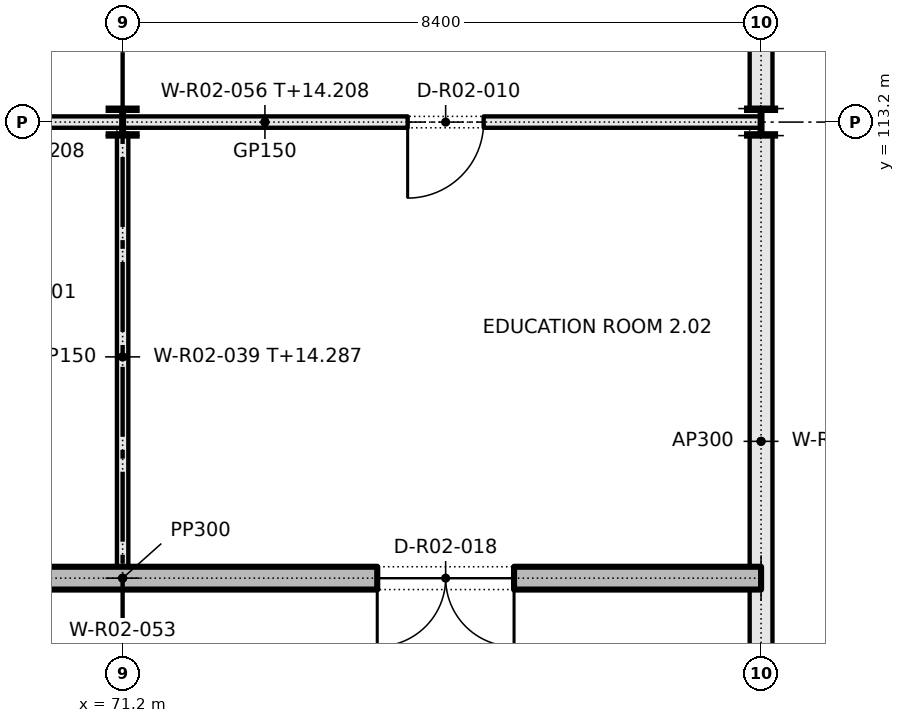
"""IFC4 building model, lengths in metres.
Left out: names, types, materials, properties, quantities, classifications, styles, units other than length and angle.
Written with IfcOpenShell. Run it as: python <this file> out.ifc"""

import sys

from ifc_helpers import new_model, si_unit, direction, frame, frame_2d, origin, origin_2d, place, context, subcontext, project, spatial, rectangle, i_section, extrude, element, fill, save


model = new_model("IFC4")
c1 = context("Model", 3, precision=1e-05, world=origin(), true_north=direction((0.0, 1.0)))
c2 = subcontext(c1, "Body", "Model", "MODEL_VIEW")
j1 = project(units=[si_unit("LENGTHUNIT", "METRE"), si_unit("PLANEANGLEUNIT", "RADIAN")], contexts=[c1])
p1 = place(None, origin())
s1 = spatial("IfcSite", under=j1, at=p1, CompositionType="ELEMENT")
p2 = place(p1, origin())
s2 = spatial("IfcBuilding", under=s1, at=p2, CompositionType="ELEMENT")
p3 = place(p2, frame((0.0, 0.0, 10.2)))
s3 = spatial("IfcBuildingStorey", under=s2, at=p3, CompositionType="ELEMENT", Elevation=10.2)
for number, where, z_axis, x_axis in (
    (1, (71.2, 113.2, 0.0), (0.0, 0.0, 1.0), (1.0, 0.0, 0.0)),
    (2, (79.6, 113.2, 0.0), (0.0, 0.0, 1.0), (1.0, 0.0, 0.0)),
):
    element("IfcColumn", number, at=place(p3, frame(where, z_axis=z_axis, x_axis=x_axis)), inside=s3, PredefinedType="COLUMN", context=c2, shape_type="SweptSolid", body=[
        extrude(i_section(OverallWidth=0.368, OverallDepth=0.356, WebThickness=0.011, FlangeThickness=0.018, FilletRadius=0.015, at=origin_2d()), origin(), (0.0, 0.0, 1.0), 4.8),
    ])
p4 = place(p3, frame((71.2, 107.2, 0.0), z_axis=(0.0, 0.0, 1.0), x_axis=(0.0, 1.0, 0.0)))
e3 = element("IfcWall", 3, at=p4, inside=s3, PredefinedType="PARTITIONING", context=c2, shape_type="SweptSolid", body=[
    extrude(rectangle(XDim=5.822, YDim=0.15, at=frame_2d((2.911, 0.0))), origin(), (0.0, 0.0, 1.0), 4.087),
])
for number, where, z_axis, x_axis in (
    (4, (79.6, 113.378, 0.0), (0.0, 0.0, 1.0), (0.0, 1.0, 0.0)),
    (5, (79.6, 104.978, 0.0), (0.0, 0.0, 1.0), (0.0, 1.0, 0.0)),
):
    element("IfcWall", number, at=place(p3, frame(where, z_axis=z_axis, x_axis=x_axis)), inside=s3, PredefinedType="PARTITIONING", context=c2, shape_type="SweptSolid", body=[
        extrude(rectangle(XDim=8.044, YDim=0.3, at=frame_2d((4.022, 0.0))), origin(), (0.0, 0.0, 1.0), 4.087),
    ])
p5 = place(p3, frame((62.8, 107.2, 0.0), z_axis=(0.0, 0.0, 1.0), x_axis=(1.0, 0.0, 0.0)))
e6 = element("IfcWall", 6, at=p5, inside=s3, PredefinedType="SOLIDWALL", context=c2, shape_type="SweptSolid", body=[
    extrude(rectangle(XDim=16.8, YDim=0.3, at=frame_2d((8.4, 0.0))), origin(), (0.0, 0.0, 1.0), 4.8),
])
p6 = place(p5, frame((3.25, 0.0, 0.0)))
e7 = element("IfcOpeningElement", 7, at=p6, cuts=e6, PredefinedType="OPENING", context=c2, shape_type="SweptSolid", body=[
    extrude(rectangle(XDim=1.8, YDim=2.1, at=frame_2d((0.9, 1.05))), frame((0.0, 0.16, 0.0), z_axis=(0.0, -1.0, 0.0), x_axis=(1.0, 0.0, 0.0)), (0.0, 0.0, 1.0), 0.32),
])
p7 = place(p5, frame((11.75, 0.0, 0.0)))
e8 = element("IfcOpeningElement", 8, at=p7, cuts=e6, PredefinedType="OPENING", context=c2, shape_type="SweptSolid", body=[
    extrude(rectangle(XDim=1.8, YDim=2.1, at=frame_2d((0.9, 1.05))), frame((0.0, 0.16, 0.0), z_axis=(0.0, -1.0, 0.0), x_axis=(1.0, 0.0, 0.0)), (0.0, 0.0, 1.0), 0.32),
])
p8 = place(p3, frame((62.794, 113.2, 0.0), z_axis=(0.0, 0.0, 1.0), x_axis=(1.0, 0.0, 0.0)))
e9 = element("IfcWall", 9, at=p8, inside=s3, PredefinedType="PARTITIONING", context=c2, shape_type="SweptSolid", body=[
    extrude(rectangle(XDim=8.411, YDim=0.15, at=frame_2d((4.206, 0.0))), origin(), (0.0, 0.0, 1.0), 4.008),
])
p9 = place(p8, frame((3.656, 0.0, 0.0)))
e10 = element("IfcOpeningElement", 10, at=p9, cuts=e9, PredefinedType="OPENING", context=c2, shape_type="SweptSolid", body=[
    extrude(rectangle(XDim=1.0, YDim=2.1, at=frame_2d((0.5, 1.05))), frame((0.0, 0.085, 0.0), z_axis=(0.0, -1.0, 0.0), x_axis=(1.0, 0.0, 0.0)), (0.0, 0.0, 1.0), 0.17),
])
p10 = place(p3, frame((71.194, 113.2, 0.0), z_axis=(0.0, 0.0, 1.0), x_axis=(1.0, 0.0, 0.0)))
e11 = element("IfcWall", 11, at=p10, inside=s3, PredefinedType="PARTITIONING", context=c2, shape_type="SweptSolid", body=[
    extrude(rectangle(XDim=8.4, YDim=0.15, at=frame_2d((4.2, 0.0))), origin(), (0.0, 0.0, 1.0), 4.008),
])
p11 = place(p10, frame((3.756, 0.0, 0.0)))
e12 = element("IfcOpeningElement", 12, at=p11, cuts=e11, PredefinedType="OPENING", context=c2, shape_type="SweptSolid", body=[
    extrude(rectangle(XDim=1.0, YDim=2.1, at=frame_2d((0.5, 1.05))), frame((0.0, 0.085, 0.0), z_axis=(0.0, -1.0, 0.0), x_axis=(1.0, 0.0, 0.0)), (0.0, 0.0, 1.0), 0.17),
])
p12 = place(p11, frame((1.0, 0.0, 0.0), z_axis=(0.0, 0.0, 1.0), x_axis=(-1.0, 0.0, 0.0)))
e13 = element("IfcDoor", 13, at=p12, inside=s3, OperationType="SINGLE_SWING_RIGHT", PredefinedType="DOOR", context=c2, shape_type="SweptSolid", body=[
    extrude(rectangle(XDim=1.0, YDim=2.1, at=frame_2d((0.5, 1.05))), frame((0.0, 0.025, 0.0), z_axis=(0.0, -1.0, 0.0), x_axis=(1.0, 0.0, 0.0)), (0.0, 0.0, 1.0), 0.05),
])
fill(e12, e13)
p13 = place(p7, frame((1.8, 0.0, 0.0), z_axis=(0.0, 0.0, 1.0), x_axis=(-1.0, 0.0, 0.0)))
e14 = element("IfcDoor", 14, at=p13, inside=s3, OperationType="DOUBLE_DOOR_SINGLE_SWING", PredefinedType="DOOR", context=c2, shape_type="SweptSolid", body=[
    extrude(rectangle(XDim=1.8, YDim=2.1, at=frame_2d((0.9, 1.05))), frame((0.0, 0.025, 0.0), z_axis=(0.0, -1.0, 0.0), x_axis=(1.0, 0.0, 0.0)), (0.0, 0.0, 1.0), 0.05),
])
fill(e8, e14)
save(model, sys.argv[1])
